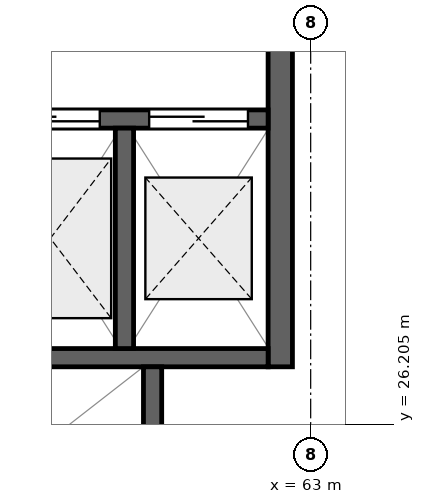
"""IFC4 building model, lengths in metres.
Left out: names, types, materials, properties, quantities, classifications, styles, units other than length and angle.
Written with IfcOpenShell. Run it as: python <this file> out.ifc"""

import sys

from ifc_helpers import new_model, si_unit, direction, frame, frame_2d, origin, place, context, subcontext, project, spatial, rectangle, extrude, element, fill, save


model = new_model("IFC4")
c1 = context("Model", 3, precision=1e-05, world=origin(), true_north=direction((0.0, 1.0)))
c2 = subcontext(c1, "Body", "Model", "MODEL_VIEW")
j1 = project(units=[si_unit("LENGTHUNIT", "METRE"), si_unit("PLANEANGLEUNIT", "RADIAN")], contexts=[c1])
p1 = place(None, origin())
s1 = spatial("IfcSite", under=j1, at=p1, CompositionType="ELEMENT")
p2 = place(p1, origin())
s2 = spatial("IfcBuilding", under=s1, at=p2, CompositionType="ELEMENT")
p3 = place(p2, frame((0.0, 0.0, 14.4)))
s3 = spatial("IfcBuildingStorey", under=s2, at=p3, CompositionType="ELEMENT", Elevation=14.4)
p4 = place(p3, frame((62.6, 26.96, 0.0), z_axis=(0.0, 0.0, 1.0), x_axis=(0.0, 1.0, 0.0)))
e1 = element("IfcWall", 1, at=p4, inside=s3, PredefinedType="SHEAR", context=c2, shape_type="SweptSolid", body=[
    extrude(rectangle(XDim=9.04, YDim=0.32, at=frame_2d((4.52, 0.0))), origin(), (0.0, 0.0, 1.0), 4.16),
])
p5 = place(p3, frame((58.54, 30.22, 0.0), z_axis=(0.0, 0.0, 1.0), x_axis=(1.0, 0.0, 0.0)))
e2 = element("IfcWall", 2, at=p5, inside=s3, PredefinedType="SHEAR", context=c2, shape_type="SweptSolid", body=[
    extrude(rectangle(XDim=3.9, YDim=0.24, at=frame_2d((1.95, 0.0))), origin(), (0.0, 0.0, 1.0), 4.31),
])
p6 = place(p5, frame((0.385, 0.0, 0.0)))
e3 = element("IfcOpeningElement", 3, at=p6, cuts=e2, PredefinedType="OPENING", context=c2, shape_type="SweptSolid", body=[
    extrude(rectangle(XDim=1.3, YDim=2.2, at=frame_2d((0.65, 1.1))), frame((0.0, 0.135, 0.0), z_axis=(0.0, -1.0, 0.0), x_axis=(1.0, 0.0, 0.0)), (0.0, 0.0, 1.0), 0.27),
])
p7 = place(p5, frame((2.335, 0.0, 0.0)))
e4 = element("IfcOpeningElement", 4, at=p7, cuts=e2, PredefinedType="OPENING", context=c2, shape_type="SweptSolid", body=[
    extrude(rectangle(XDim=1.3, YDim=2.2, at=frame_2d((0.65, 1.1))), frame((0.0, 0.135, 0.0), z_axis=(0.0, -1.0, 0.0), x_axis=(1.0, 0.0, 0.0)), (0.0, 0.0, 1.0), 0.27),
])
p8 = place(p3, frame((58.54, 27.08, 0.0), z_axis=(0.0, 0.0, 1.0), x_axis=(1.0, 0.0, 0.0)))
e5 = element("IfcWall", 5, at=p8, inside=s3, PredefinedType="SHEAR", context=c2, shape_type="SweptSolid", body=[
    extrude(rectangle(XDim=3.9, YDim=0.24, at=frame_2d((1.95, 0.0))), origin(), (0.0, 0.0, 1.0), 4.31),
])
p9 = place(p3, frame((60.55, 27.2, 0.0), z_axis=(0.0, 0.0, 1.0), x_axis=(0.0, 1.0, 0.0)))
e6 = element("IfcWall", 6, at=p9, inside=s3, PredefinedType="SHEAR", context=c2, shape_type="SweptSolid", body=[
    extrude(rectangle(XDim=2.9, YDim=0.24, at=frame_2d((1.45, 0.0))), origin(), (0.0, 0.0, 1.0), 4.31),
])
p10 = place(p3, frame((60.92, 24.96, 0.0), z_axis=(0.0, 0.0, 1.0), x_axis=(0.0, 1.0, 0.0)))
e7 = element("IfcWall", 7, at=p10, inside=s3, PredefinedType="SHEAR", context=c2, shape_type="SweptSolid", body=[
    extrude(rectangle(XDim=2.0, YDim=0.24, at=frame_2d((1.0, 0.0))), origin(), (0.0, 0.0, 1.0), 4.31),
])
p11 = place(p6, origin())
e8 = element("IfcDoor", 8, at=p11, inside=s3, OperationType="DOUBLE_DOOR_SLIDING", PredefinedType="DOOR", context=c2, shape_type="SweptSolid", body=[
    extrude(rectangle(XDim=1.3, YDim=2.2, at=frame_2d((0.65, 1.1))), frame((0.0, 0.025, 0.0), z_axis=(0.0, -1.0, 0.0), x_axis=(1.0, 0.0, 0.0)), (0.0, 0.0, 1.0), 0.05),
])
fill(e3, e8)
p12 = place(p7, origin())
e9 = element("IfcDoor", 9, at=p12, inside=s3, OperationType="DOUBLE_DOOR_SLIDING", PredefinedType="DOOR", context=c2, shape_type="SweptSolid", body=[
    extrude(rectangle(XDim=1.3, YDim=2.2, at=frame_2d((0.65, 1.1))), frame((0.0, 0.025, 0.0), z_axis=(0.0, -1.0, 0.0), x_axis=(1.0, 0.0, 0.0)), (0.0, 0.0, 1.0), 0.05),
])
fill(e4, e9)
save(model, sys.argv[1])
